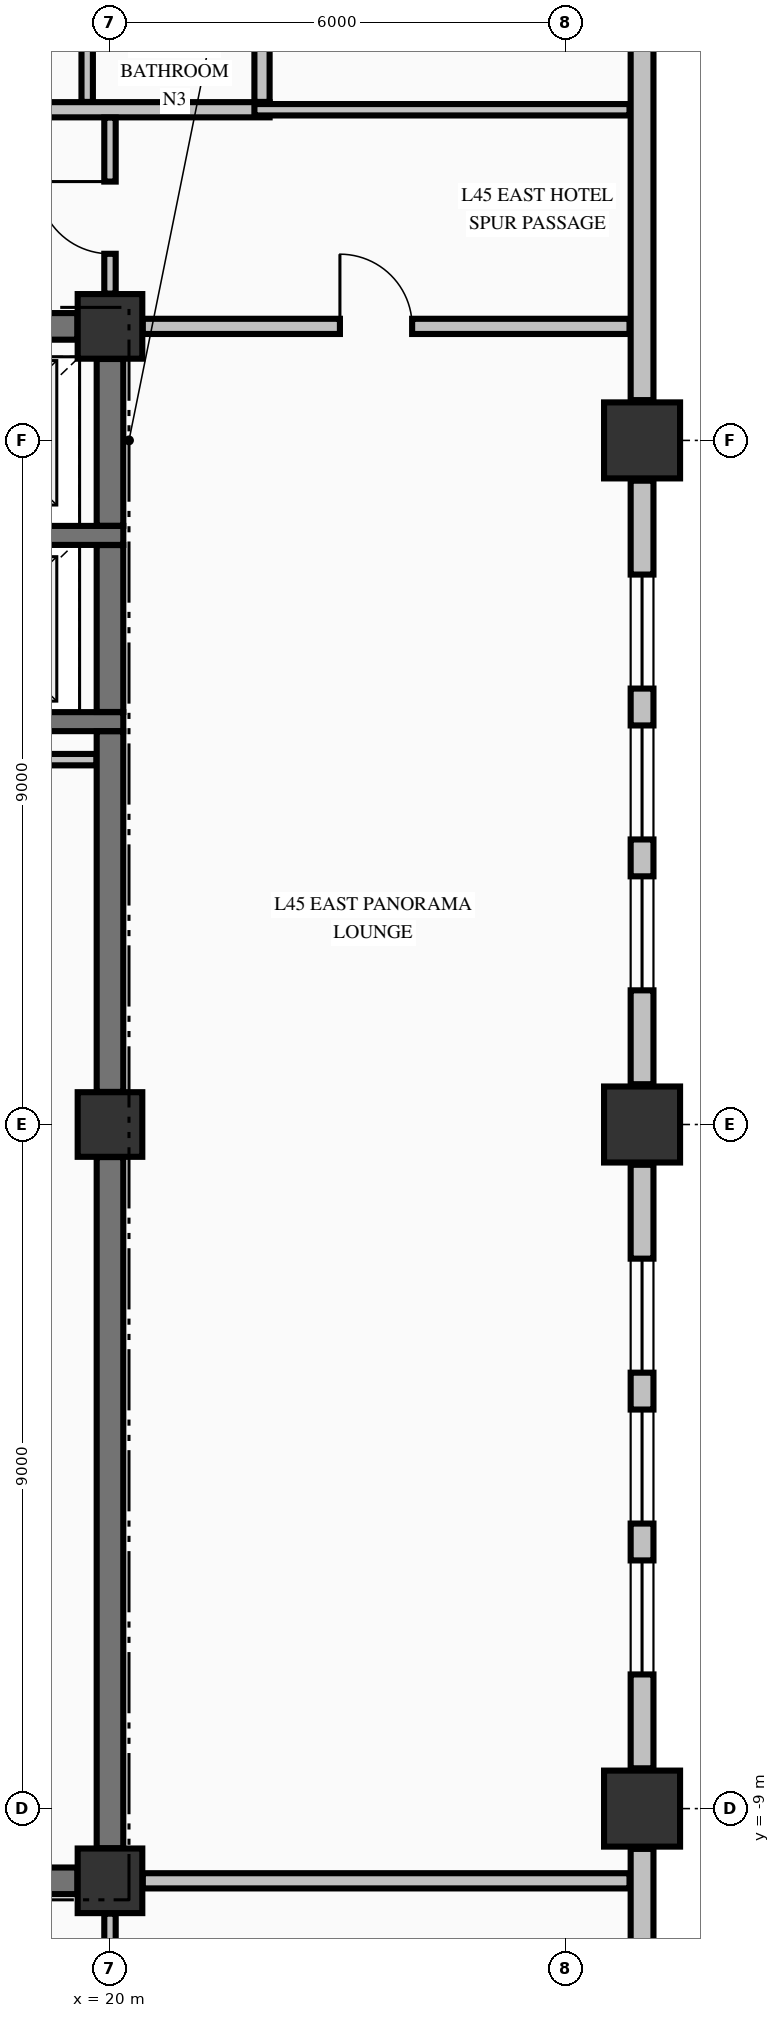
"""IFC4 building model, lengths in metres.
Left out: names, types, materials, properties, quantities, classifications, styles, units other than length and angle.
Written with IfcOpenShell. Run it as: python <this file> out.ifc"""

import sys

from ifc_helpers import new_model, si_unit, direction, frame, frame_2d, origin, origin_2d, place, context, subcontext, project, spatial, rectangle, extrude, element, fill, save


model = new_model("IFC4")
c1 = context("Model", 3, precision=1e-05, world=origin(), true_north=direction((0.0, 1.0)))
c2 = subcontext(c1, "Body", "Model", "MODEL_VIEW")
j1 = project(units=[si_unit("LENGTHUNIT", "METRE"), si_unit("PLANEANGLEUNIT", "RADIAN")], contexts=[c1])
p1 = place(None, origin())
s1 = spatial("IfcSite", under=j1, at=p1, CompositionType="ELEMENT")
p2 = place(p1, origin())
s2 = spatial("IfcBuilding", under=s1, at=p2, CompositionType="ELEMENT")
p3 = place(p2, frame((0.0, 0.0, 176.26)))
s3 = spatial("IfcBuildingStorey", under=s2, at=p3, CompositionType="ELEMENT", Elevation=176.26)
for number, where, z_axis, x_axis in (
    (1, (27.0, -9.0, -0.275), (0.0, 0.0, 1.0), (1.0, 0.0, 0.0)),
    (2, (27.0, 0.0, -0.275), (0.0, 0.0, 1.0), (1.0, 0.0, 0.0)),
    (3, (27.0, 9.0, -0.275), (0.0, 0.0, 1.0), (1.0, 0.0, 0.0)),
):
    element("IfcColumn", number, at=place(p3, frame(where, z_axis=z_axis, x_axis=x_axis)), inside=s3, PredefinedType="COLUMN", context=c2, shape_type="SweptSolid", body=[
        extrude(rectangle(XDim=1.0, YDim=1.0, at=origin_2d()), origin(), (0.0, 0.0, 1.0), 3.425),
    ])
for number, where, z_axis, x_axis in (
    (4, (20.0, -9.95, -0.275), (0.0, 0.0, 1.0), (1.0, 0.0, 0.0)),
    (5, (20.0, 10.5, -0.275), (0.0, 0.0, 1.0), (1.0, 0.0, 0.0)),
    (6, (20.0, 0.0, -0.275), (0.0, 0.0, 1.0), (1.0, 0.0, 0.0)),
):
    element("IfcColumn", number, at=place(p3, frame(where, z_axis=z_axis, x_axis=x_axis)), inside=s3, PredefinedType="COLUMN", context=c2, shape_type="SweptSolid", body=[
        extrude(rectangle(XDim=0.85, YDim=0.85, at=origin_2d()), origin(), (0.0, 0.0, 1.0), 3.425),
    ])
p4 = place(p3, frame((27.0, -18.97, 0.0), z_axis=(0.0, 0.0, 1.0), x_axis=(0.0, 1.0, 0.0)))
e7 = element("IfcWall", 7, at=p4, inside=s3, PredefinedType="STANDARD", context=c2, shape_type="SweptSolid", body=[
    extrude(rectangle(XDim=9.44, YDim=0.3, at=frame_2d((4.72, 0.0))), origin(), (0.0, 0.0, 1.0), 2.542),
])
p5 = place(p3, frame((27.0, -8.47, 0.0), z_axis=(0.0, 0.0, 1.0), x_axis=(0.0, 1.0, 0.0)))
e8 = element("IfcWall", 8, at=p5, inside=s3, PredefinedType="STANDARD", context=c2, shape_type="SweptSolid", body=[
    extrude(rectangle(XDim=7.94, YDim=0.3, at=frame_2d((3.97, 0.0))), origin(), (0.0, 0.0, 1.0), 2.542),
])
p6 = place(p5, frame((1.235, 0.0, 0.72)))
e9 = element("IfcOpeningElement", 9, at=p6, cuts=e8, PredefinedType="OPENING", context=c2, shape_type="SweptSolid", body=[
    extrude(rectangle(XDim=1.5, YDim=1.6, at=frame_2d((0.75, 0.8))), frame((0.0, 0.16, 0.0), z_axis=(0.0, -1.0, 0.0), x_axis=(1.0, 0.0, 0.0)), (0.0, 0.0, 1.0), 0.32),
])
p7 = place(p5, frame((3.22, 0.0, 0.72)))
e10 = element("IfcOpeningElement", 10, at=p7, cuts=e8, PredefinedType="OPENING", context=c2, shape_type="SweptSolid", body=[
    extrude(rectangle(XDim=1.5, YDim=1.6, at=frame_2d((0.75, 0.8))), frame((0.0, 0.16, 0.0), z_axis=(0.0, -1.0, 0.0), x_axis=(1.0, 0.0, 0.0)), (0.0, 0.0, 1.0), 0.32),
])
p8 = place(p5, frame((5.205, 0.0, 0.72)))
e11 = element("IfcOpeningElement", 11, at=p8, cuts=e8, PredefinedType="OPENING", context=c2, shape_type="SweptSolid", body=[
    extrude(rectangle(XDim=1.5, YDim=1.6, at=frame_2d((0.75, 0.8))), frame((0.0, 0.16, 0.0), z_axis=(0.0, -1.0, 0.0), x_axis=(1.0, 0.0, 0.0)), (0.0, 0.0, 1.0), 0.32),
])
p9 = place(p3, frame((27.0, 0.53, 0.0), z_axis=(0.0, 0.0, 1.0), x_axis=(0.0, 1.0, 0.0)))
e12 = element("IfcWall", 12, at=p9, inside=s3, PredefinedType="STANDARD", context=c2, shape_type="SweptSolid", body=[
    extrude(rectangle(XDim=7.94, YDim=0.3, at=frame_2d((3.97, 0.0))), origin(), (0.0, 0.0, 1.0), 2.542),
])
p10 = place(p9, frame((1.235, 0.0, 0.72)))
e13 = element("IfcOpeningElement", 13, at=p10, cuts=e12, PredefinedType="OPENING", context=c2, shape_type="SweptSolid", body=[
    extrude(rectangle(XDim=1.5, YDim=1.6, at=frame_2d((0.75, 0.8))), frame((0.0, 0.16, 0.0), z_axis=(0.0, -1.0, 0.0), x_axis=(1.0, 0.0, 0.0)), (0.0, 0.0, 1.0), 0.32),
])
p11 = place(p9, frame((3.22, 0.0, 0.72)))
e14 = element("IfcOpeningElement", 14, at=p11, cuts=e12, PredefinedType="OPENING", context=c2, shape_type="SweptSolid", body=[
    extrude(rectangle(XDim=1.5, YDim=1.6, at=frame_2d((0.75, 0.8))), frame((0.0, 0.16, 0.0), z_axis=(0.0, -1.0, 0.0), x_axis=(1.0, 0.0, 0.0)), (0.0, 0.0, 1.0), 0.32),
])
p12 = place(p9, frame((5.205, 0.0, 0.72)))
e15 = element("IfcOpeningElement", 15, at=p12, cuts=e12, PredefinedType="OPENING", context=c2, shape_type="SweptSolid", body=[
    extrude(rectangle(XDim=1.5, YDim=1.6, at=frame_2d((0.75, 0.8))), frame((0.0, 0.16, 0.0), z_axis=(0.0, -1.0, 0.0), x_axis=(1.0, 0.0, 0.0)), (0.0, 0.0, 1.0), 0.32),
])
p13 = place(p3, frame((27.0, 9.53, 0.0), z_axis=(0.0, 0.0, 1.0), x_axis=(0.0, 1.0, 0.0)))
e16 = element("IfcWall", 16, at=p13, inside=s3, PredefinedType="STANDARD", context=c2, shape_type="SweptSolid", body=[
    extrude(rectangle(XDim=9.44, YDim=0.3, at=frame_2d((4.72, 0.0))), origin(), (0.0, 0.0, 1.0), 2.542),
])
p14 = place(p3, frame((14.7, -9.95, 0.0), z_axis=(0.0, 0.0, 1.0), x_axis=(1.0, 0.0, 0.0)))
e17 = element("IfcWall", 17, at=p14, inside=s3, PredefinedType="SHEAR", context=c2, shape_type="SweptSolid", body=[
    extrude(rectangle(XDim=4.871, YDim=0.35, at=frame_2d((2.436, 0.0))), origin(), (0.0, 0.0, 1.0), 3.15),
])
p15 = place(p14, frame((3.25, 0.0, 0.0)))
e18 = element("IfcOpeningElement", 18, at=p15, cuts=e17, PredefinedType="OPENING", context=c2, shape_type="SweptSolid", body=[
    extrude(rectangle(XDim=0.9, YDim=2.15, at=frame_2d((0.45, 1.075))), frame((0.0, 0.185, 0.0), z_axis=(0.0, -1.0, 0.0), x_axis=(1.0, 0.0, 0.0)), (0.0, 0.0, 1.0), 0.37),
])
p16 = place(p14, frame((0.575, 0.0, 0.0)))
e19 = element("IfcOpeningElement", 19, at=p16, cuts=e17, PredefinedType="OPENING", context=c2, shape_type="SweptSolid", body=[
    extrude(rectangle(XDim=0.95, YDim=2.15, at=frame_2d((0.475, 1.075))), frame((0.0, 0.185, 0.0), z_axis=(0.0, -1.0, 0.0), x_axis=(1.0, 0.0, 0.0)), (0.0, 0.0, 1.0), 0.37),
])
for number, where, z_axis, x_axis in (
    (20, (17.025, 5.3, 0.0), (0.0, 0.0, 1.0), (1.0, 0.0, 0.0)),
    (21, (17.025, 7.75, 0.0), (0.0, 0.0, 1.0), (1.0, 0.0, 0.0)),
):
    element("IfcWall", number, at=place(p3, frame(where, z_axis=z_axis, x_axis=x_axis)), inside=s3, PredefinedType="SOLIDWALL", context=c2, shape_type="SweptSolid", body=[
        extrude(rectangle(XDim=3.15, YDim=0.25, at=frame_2d((1.575, 0.0))), origin(), (0.0, 0.0, 1.0), 3.15),
    ])
p17 = place(p3, frame((14.7, 10.5, 0.0), z_axis=(0.0, 0.0, 1.0), x_axis=(1.0, 0.0, 0.0)))
e22 = element("IfcWall", 22, at=p17, inside=s3, PredefinedType="SHEAR", context=c2, shape_type="SweptSolid", body=[
    extrude(rectangle(XDim=4.871, YDim=0.35, at=frame_2d((2.436, 0.0))), origin(), (0.0, 0.0, 1.0), 3.15),
])
p18 = place(p17, frame((0.7, 0.0, 0.0)))
e23 = element("IfcOpeningElement", 23, at=p18, cuts=e22, PredefinedType="OPENING", context=c2, shape_type="SweptSolid", body=[
    extrude(rectangle(XDim=1.1, YDim=2.15, at=frame_2d((0.55, 1.075))), frame((0.0, 0.185, 0.0), z_axis=(0.0, -1.0, 0.0), x_axis=(1.0, 0.0, 0.0)), (0.0, 0.0, 1.0), 0.37),
])
p19 = place(p3, frame((20.431, -9.95, 0.0), z_axis=(0.0, 0.0, 1.0), x_axis=(1.0, 0.0, 0.0)))
e24 = element("IfcWall", 24, at=p19, inside=s3, PredefinedType="PARTITIONING", context=c2, shape_type="SweptSolid", body=[
    extrude(rectangle(XDim=6.404, YDim=0.2, at=frame_2d((3.202, 0.0))), origin(), (0.0, 0.0, 1.0), 3.15),
])
p20 = place(p3, frame((14.878, 4.8, 0.0), z_axis=(0.0, 0.0, 1.0), x_axis=(1.0, 0.0, 0.0)))
e25 = element("IfcWall", 25, at=p20, inside=s3, PredefinedType="PARTITIONING", context=c2, shape_type="SweptSolid", body=[
    extrude(rectangle(XDim=4.944, YDim=0.15, at=frame_2d((2.472, 0.0))), origin(), (0.0, 0.0, 1.0), 3.15),
])
p21 = place(p3, frame((20.431, 10.5, 0.0), z_axis=(0.0, 0.0, 1.0), x_axis=(1.0, 0.0, 0.0)))
e26 = element("IfcWall", 26, at=p21, inside=s3, PredefinedType="PARTITIONING", context=c2, shape_type="SweptSolid", body=[
    extrude(rectangle(XDim=6.404, YDim=0.2, at=frame_2d((3.202, 0.0))), origin(), (0.0, 0.0, 1.0), 3.15),
])
p22 = place(p21, frame((2.594, 0.0, 0.0)))
e27 = element("IfcOpeningElement", 27, at=p22, cuts=e26, PredefinedType="OPENING", context=c2, shape_type="SweptSolid", body=[
    extrude(rectangle(XDim=0.95, YDim=2.15, at=frame_2d((0.475, 1.075))), frame((0.0, 0.11, 0.0), z_axis=(0.0, -1.0, 0.0), x_axis=(1.0, 0.0, 0.0)), (0.0, 0.0, 1.0), 0.22),
])
p23 = place(p3, frame((-17.1, 13.35, 0.0), z_axis=(0.0, 0.0, 1.0), x_axis=(1.0, 0.0, 0.0)))
e28 = element("IfcWall", 28, at=p23, inside=s3, PredefinedType="PARTITIONING", context=c2, shape_type="SweptSolid", body=[
    extrude(rectangle(XDim=39.2, YDim=0.2, at=frame_2d((19.6, 0.0))), origin(), (0.0, 0.0, 1.0), 3.15),
])
p24 = place(p23, frame((3.695, 0.0, 0.0)))
e29 = element("IfcOpeningElement", 29, at=p24, cuts=e28, PredefinedType="OPENING", context=c2, shape_type="SweptSolid", body=[
    extrude(rectangle(XDim=0.95, YDim=2.15, at=frame_2d((0.475, 1.075))), frame((0.0, 0.11, 0.0), z_axis=(0.0, -1.0, 0.0), x_axis=(1.0, 0.0, 0.0)), (0.0, 0.0, 1.0), 0.22),
])
p25 = place(p23, frame((19.725, 0.0, 0.0)))
e30 = element("IfcOpeningElement", 30, at=p25, cuts=e28, PredefinedType="OPENING", context=c2, shape_type="SweptSolid", body=[
    extrude(rectangle(XDim=0.95, YDim=2.15, at=frame_2d((0.475, 1.075))), frame((0.0, 0.11, 0.0), z_axis=(0.0, -1.0, 0.0), x_axis=(1.0, 0.0, 0.0)), (0.0, 0.0, 1.0), 0.22),
])
p26 = place(p23, frame((30.005, 0.0, 0.0)))
e31 = element("IfcOpeningElement", 31, at=p26, cuts=e28, PredefinedType="OPENING", context=c2, shape_type="SweptSolid", body=[
    extrude(rectangle(XDim=0.95, YDim=2.15, at=frame_2d((0.475, 1.075))), frame((0.0, 0.11, 0.0), z_axis=(0.0, -1.0, 0.0), x_axis=(1.0, 0.0, 0.0)), (0.0, 0.0, 1.0), 0.22),
])
p27 = place(p3, frame((21.9, 13.35, 0.0), z_axis=(0.0, 0.0, 1.0), x_axis=(1.0, 0.0, 0.0)))
e32 = element("IfcWall", 32, at=p27, inside=s3, PredefinedType="PARTITIONING", context=c2, shape_type="SweptSolid", body=[
    extrude(rectangle(XDim=4.935, YDim=0.15, at=frame_2d((2.468, 0.0))), origin(), (0.0, 0.0, 1.0), 3.15),
])
p28 = place(p3, frame((20.0, -9.521, 0.0), z_axis=(0.0, 0.0, 1.0), x_axis=(0.0, 1.0, 0.0)))
e33 = element("IfcWall", 33, at=p28, inside=s3, PredefinedType="SHEAR", context=c2, shape_type="SweptSolid", body=[
    extrude(rectangle(XDim=9.092, YDim=0.35, at=frame_2d((4.546, 0.0))), origin(), (0.0, 0.0, 1.0), 3.15),
])
p29 = place(p3, frame((20.0, 0.429, 0.0), z_axis=(0.0, 0.0, 1.0), x_axis=(0.0, 1.0, 0.0)))
e34 = element("IfcWall", 34, at=p29, inside=s3, PredefinedType="SHEAR", context=c2, shape_type="SweptSolid", body=[
    extrude(rectangle(XDim=4.744, YDim=0.35, at=frame_2d((2.372, 0.0))), origin(), (0.0, 0.0, 1.0), 3.15),
])
p30 = place(p3, frame((20.0, 5.427, 0.0), z_axis=(0.0, 0.0, 1.0), x_axis=(0.0, 1.0, 0.0)))
e35 = element("IfcWall", 35, at=p30, inside=s3, PredefinedType="SHEAR", context=c2, shape_type="SweptSolid", body=[
    extrude(rectangle(XDim=2.196, YDim=0.35, at=frame_2d((1.098, 0.0))), origin(), (0.0, 0.0, 1.0), 3.15),
])
p31 = place(p3, frame((20.0, 7.877, 0.0), z_axis=(0.0, 0.0, 1.0), x_axis=(0.0, 1.0, 0.0)))
e36 = element("IfcWall", 36, at=p31, inside=s3, PredefinedType="SHEAR", context=c2, shape_type="SweptSolid", body=[
    extrude(rectangle(XDim=2.194, YDim=0.35, at=frame_2d((1.097, 0.0))), origin(), (0.0, 0.0, 1.0), 3.15),
])
p32 = place(p3, frame((19.7, 13.453, 0.0), z_axis=(0.0, 0.0, 1.0), x_axis=(0.0, 1.0, 0.0)))
e37 = element("IfcWall", 37, at=p32, inside=s3, PredefinedType="PARTITIONING", context=c2, shape_type="SweptSolid", body=[
    extrude(rectangle(XDim=2.069, YDim=0.15, at=frame_2d((1.035, 0.0))), origin(), (0.0, 0.0, 1.0), 2.342),
])
p33 = place(p3, frame((20.0, -12.697, 0.0), z_axis=(0.0, 0.0, 1.0), x_axis=(0.0, 1.0, 0.0)))
e38 = element("IfcWall", 38, at=p33, inside=s3, PredefinedType="PARTITIONING", context=c2, shape_type="SweptSolid", body=[
    extrude(rectangle(XDim=2.316, YDim=0.15, at=frame_2d((1.158, 0.0))), origin(), (0.0, 0.0, 1.0), 2.342),
])
p34 = place(p3, frame((20.0, 10.931, 0.0), z_axis=(0.0, 0.0, 1.0), x_axis=(0.0, 1.0, 0.0)))
e39 = element("IfcWall", 39, at=p34, inside=s3, PredefinedType="PARTITIONING", context=c2, shape_type="SweptSolid", body=[
    extrude(rectangle(XDim=2.316, YDim=0.15, at=frame_2d((1.158, 0.0))), origin(), (0.0, 0.0, 1.0), 2.342),
])
p35 = place(p34, frame((0.524, 0.0, 0.0)))
e40 = element("IfcOpeningElement", 40, at=p35, cuts=e39, PredefinedType="OPENING", context=c2, shape_type="SweptSolid", body=[
    extrude(rectangle(XDim=0.95, YDim=2.15, at=frame_2d((0.475, 1.075))), frame((0.0, 0.085, 0.0), z_axis=(0.0, -1.0, 0.0), x_axis=(1.0, 0.0, 0.0)), (0.0, 0.0, 1.0), 0.17),
])
p36 = place(p3, frame((22.0, 13.453, 0.0), z_axis=(0.0, 0.0, 1.0), x_axis=(0.0, 1.0, 0.0)))
e41 = element("IfcWall", 41, at=p36, inside=s3, PredefinedType="PARTITIONING", context=c2, shape_type="SweptSolid", body=[
    extrude(rectangle(XDim=2.069, YDim=0.2, at=frame_2d((1.035, 0.0))), origin(), (0.0, 0.0, 1.0), 3.15),
])
p37 = place(p6, origin())
e42 = element("IfcWindow", 42, at=p37, inside=s3, PartitioningType="SINGLE_PANEL", PredefinedType="WINDOW", context=c2, shape_type="SweptSolid", body=[
    extrude(rectangle(XDim=1.5, YDim=1.6, at=frame_2d((0.75, 0.8))), frame((0.0, 0.03, 0.0), z_axis=(0.0, -1.0, 0.0), x_axis=(1.0, 0.0, 0.0)), (0.0, 0.0, 1.0), 0.06),
])
fill(e9, e42)
p38 = place(p7, origin())
e43 = element("IfcWindow", 43, at=p38, inside=s3, PartitioningType="SINGLE_PANEL", PredefinedType="WINDOW", context=c2, shape_type="SweptSolid", body=[
    extrude(rectangle(XDim=1.5, YDim=1.6, at=frame_2d((0.75, 0.8))), frame((0.0, 0.03, 0.0), z_axis=(0.0, -1.0, 0.0), x_axis=(1.0, 0.0, 0.0)), (0.0, 0.0, 1.0), 0.06),
])
fill(e10, e43)
p39 = place(p8, origin())
e44 = element("IfcWindow", 44, at=p39, inside=s3, PartitioningType="SINGLE_PANEL", PredefinedType="WINDOW", context=c2, shape_type="SweptSolid", body=[
    extrude(rectangle(XDim=1.5, YDim=1.6, at=frame_2d((0.75, 0.8))), frame((0.0, 0.03, 0.0), z_axis=(0.0, -1.0, 0.0), x_axis=(1.0, 0.0, 0.0)), (0.0, 0.0, 1.0), 0.06),
])
fill(e11, e44)
p40 = place(p10, origin())
e45 = element("IfcWindow", 45, at=p40, inside=s3, PartitioningType="SINGLE_PANEL", PredefinedType="WINDOW", context=c2, shape_type="SweptSolid", body=[
    extrude(rectangle(XDim=1.5, YDim=1.6, at=frame_2d((0.75, 0.8))), frame((0.0, 0.03, 0.0), z_axis=(0.0, -1.0, 0.0), x_axis=(1.0, 0.0, 0.0)), (0.0, 0.0, 1.0), 0.06),
])
fill(e13, e45)
p41 = place(p11, origin())
e46 = element("IfcWindow", 46, at=p41, inside=s3, PartitioningType="SINGLE_PANEL", PredefinedType="WINDOW", context=c2, shape_type="SweptSolid", body=[
    extrude(rectangle(XDim=1.5, YDim=1.6, at=frame_2d((0.75, 0.8))), frame((0.0, 0.03, 0.0), z_axis=(0.0, -1.0, 0.0), x_axis=(1.0, 0.0, 0.0)), (0.0, 0.0, 1.0), 0.06),
])
fill(e14, e46)
p42 = place(p12, origin())
e47 = element("IfcWindow", 47, at=p42, inside=s3, PartitioningType="SINGLE_PANEL", PredefinedType="WINDOW", context=c2, shape_type="SweptSolid", body=[
    extrude(rectangle(XDim=1.5, YDim=1.6, at=frame_2d((0.75, 0.8))), frame((0.0, 0.03, 0.0), z_axis=(0.0, -1.0, 0.0), x_axis=(1.0, 0.0, 0.0)), (0.0, 0.0, 1.0), 0.06),
])
fill(e15, e47)
p43 = place(p35, origin())
e48 = element("IfcDoor", 48, at=p43, inside=s3, OperationType="SINGLE_SWING_RIGHT", PredefinedType="DOOR", context=c2, shape_type="SweptSolid", body=[
    extrude(rectangle(XDim=0.95, YDim=2.15, at=frame_2d((0.475, 1.075))), frame((0.0, 0.025, 0.0), z_axis=(0.0, -1.0, 0.0), x_axis=(1.0, 0.0, 0.0)), (0.0, 0.0, 1.0), 0.05),
])
fill(e40, e48)
p44 = place(p22, origin())
e49 = element("IfcDoor", 49, at=p44, inside=s3, OperationType="SINGLE_SWING_LEFT", PredefinedType="DOOR", context=c2, shape_type="SweptSolid", body=[
    extrude(rectangle(XDim=0.95, YDim=2.15, at=frame_2d((0.475, 1.075))), frame((0.0, 0.025, 0.0), z_axis=(0.0, -1.0, 0.0), x_axis=(1.0, 0.0, 0.0)), (0.0, 0.0, 1.0), 0.05),
])
fill(e27, e49)
save(model, sys.argv[1])
